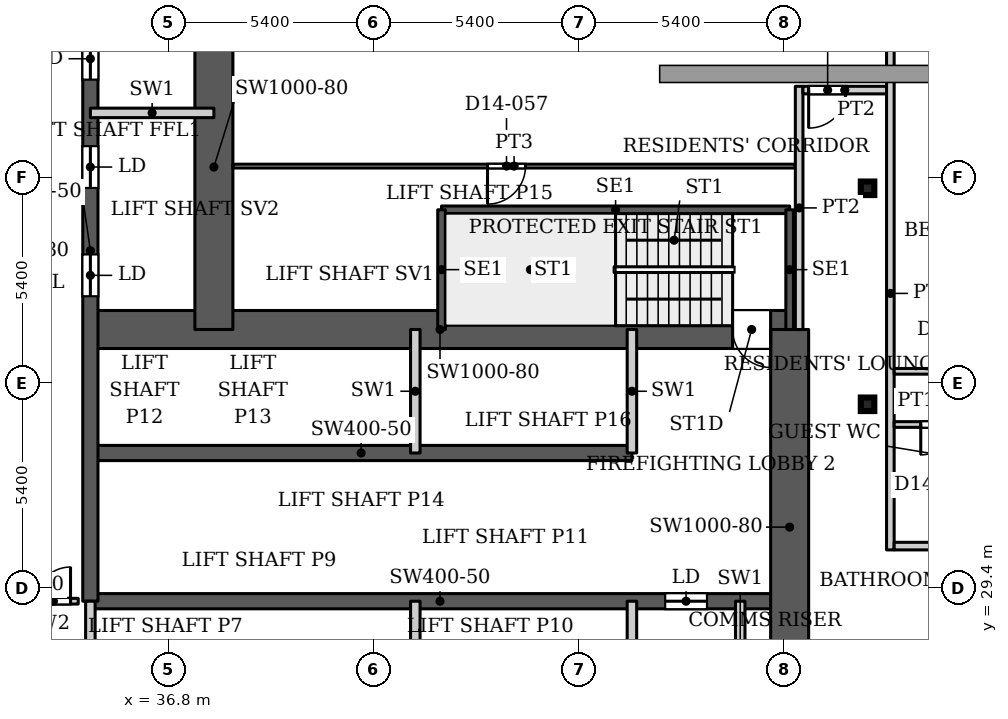
"""IFC4 building model, lengths in metres.
Left out: names, types, materials, properties, quantities, classifications, styles, units other than length and angle.
Written with IfcOpenShell. Run it as: python <this file> out.ifc"""

import sys

from ifc_helpers import new_model, si_unit, direction, frame, frame_2d, origin, origin_2d, place, context, subcontext, project, spatial, rectangle, hollow_rectangle, extrude, source, transform, mapped, element, fill, save


model = new_model("IFC4")
c1 = context("Model", 3, precision=1e-05, world=origin(), true_north=direction((0.0, 1.0)))
c2 = subcontext(c1, "Body", "Model", "MODEL_VIEW")
j1 = project(units=[si_unit("LENGTHUNIT", "METRE"), si_unit("PLANEANGLEUNIT", "RADIAN")], contexts=[c1])
p1 = place(None, origin())
s1 = spatial("IfcSite", under=j1, at=p1, CompositionType="ELEMENT")
p2 = place(p1, origin())
s2 = spatial("IfcBuilding", under=s1, at=p2, CompositionType="ELEMENT")
p3 = place(p2, frame((0.0, 0.0, 61.7)))
s3 = spatial("IfcBuildingStorey", under=s2, at=p3, CompositionType="ELEMENT", Elevation=61.7)
for number, where, z_axis, x_axis in (
    (1, (55.2, 34.232, 0.0), (0.0, 0.0, 1.0), (1.0, 0.0, 0.0)),
    (2, (55.2, 39.916, 0.0), (0.0, 0.0, 1.0), (1.0, 0.0, 0.0)),
):
    element("IfcColumn", number, at=place(p3, frame(where, z_axis=z_axis, x_axis=x_axis)), inside=s3, PredefinedType="COLUMN", context=c2, shape_type="SweptSolid", body=[
        extrude(hollow_rectangle(XDim=0.356, YDim=0.356, WallThickness=0.016, InnerFilletRadius=0.016, OuterFilletRadius=0.032, at=origin_2d()), origin(), (0.0, 0.0, 1.0), 3.9),
    ])
p4 = place(p3, frame((34.75, 29.05, 0.0), z_axis=(0.0, 0.0, 1.0), x_axis=(1.0, 0.0, 0.0)))
e3 = element("IfcWall", 3, at=p4, inside=s3, PredefinedType="SHEAR", context=c2, shape_type="SweptSolid", body=[
    extrude(rectangle(XDim=18.4, YDim=0.4, at=frame_2d((9.2, 0.0))), origin(), (0.0, 0.0, 1.0), 3.9),
])
p5 = place(p4, frame((15.125, 0.0, 0.0)))
e4 = element("IfcOpeningElement", 4, at=p5, cuts=e3, PredefinedType="OPENING", context=c2, shape_type="SweptSolid", body=[
    extrude(rectangle(XDim=1.1, YDim=2.2, at=frame_2d((0.55, 1.1))), frame((0.0, 0.21, 0.0), z_axis=(0.0, -1.0, 0.0), x_axis=(1.0, 0.0, 0.0)), (0.0, 0.0, 1.0), 0.42),
])
p6 = place(p3, frame((34.75, 32.95, 0.0), z_axis=(0.0, 0.0, 1.0), x_axis=(1.0, 0.0, 0.0)))
e5 = element("IfcWall", 5, at=p6, inside=s3, PredefinedType="SHEAR", context=c2, shape_type="SweptSolid", body=[
    extrude(rectangle(XDim=14.25, YDim=0.4, at=frame_2d((7.125, 0.0))), origin(), (0.0, 0.0, 1.0), 3.9),
])
p7 = place(p3, frame((34.75, 36.2, 0.0), z_axis=(0.0, 0.0, 1.0), x_axis=(1.0, 0.0, 0.0)))
e6 = element("IfcWall", 6, at=p7, inside=s3, PredefinedType="SHEAR", context=c2, shape_type="SweptSolid", body=[
    extrude(rectangle(XDim=18.4, YDim=1.0, at=frame_2d((9.2, 0.0))), origin(), (0.0, 0.0, 1.0), 3.9),
])
p8 = place(p7, frame((16.9, 0.0, 0.0)))
e7 = element("IfcOpeningElement", 7, at=p8, cuts=e6, PredefinedType="OPENING", context=c2, shape_type="SweptSolid", body=[
    extrude(rectangle(XDim=1.0, YDim=2.2, at=frame_2d((0.5, 1.1))), frame((0.0, 0.51, 0.0), z_axis=(0.0, -1.0, 0.0), x_axis=(1.0, 0.0, 0.0)), (0.0, 0.0, 1.0), 1.02),
])
p9 = place(p3, frame((34.75, 29.05, 0.0), z_axis=(0.0, 0.0, 1.0), x_axis=(0.0, 1.0, 0.0)))
e8 = element("IfcWall", 8, at=p9, inside=s3, PredefinedType="SHEAR", context=c2, shape_type="SweptSolid", body=[
    extrude(rectangle(XDim=18.45, YDim=0.4, at=frame_2d((9.225, 0.0))), origin(), (0.0, 0.0, 1.0), 3.9),
])
p10 = place(p9, frame((8.025, 0.0, 0.0)))
e9 = element("IfcOpeningElement", 9, at=p10, cuts=e8, PredefinedType="OPENING", context=c2, shape_type="SweptSolid", body=[
    extrude(rectangle(XDim=1.1, YDim=2.2, at=frame_2d((0.55, 1.1))), frame((0.0, 0.21, 0.0), z_axis=(0.0, -1.0, 0.0), x_axis=(1.0, 0.0, 0.0)), (0.0, 0.0, 1.0), 0.42),
])
p11 = place(p9, frame((10.875, 0.0, 0.0)))
e10 = element("IfcOpeningElement", 10, at=p11, cuts=e8, PredefinedType="OPENING", context=c2, shape_type="SweptSolid", body=[
    extrude(rectangle(XDim=1.1, YDim=2.2, at=frame_2d((0.55, 1.1))), frame((0.0, 0.21, 0.0), z_axis=(0.0, -1.0, 0.0), x_axis=(1.0, 0.0, 0.0)), (0.0, 0.0, 1.0), 0.42),
])
p12 = place(p9, frame((13.725, 0.0, 0.0)))
e11 = element("IfcOpeningElement", 11, at=p12, cuts=e8, PredefinedType="OPENING", context=c2, shape_type="SweptSolid", body=[
    extrude(rectangle(XDim=1.1, YDim=2.2, at=frame_2d((0.55, 1.1))), frame((0.0, 0.21, 0.0), z_axis=(0.0, -1.0, 0.0), x_axis=(1.0, 0.0, 0.0)), (0.0, 0.0, 1.0), 0.42),
])
p13 = place(p9, frame((15.95, 0.0, 0.0)))
e12 = element("IfcOpeningElement", 12, at=p13, cuts=e8, PredefinedType="OPENING", context=c2, shape_type="SweptSolid", body=[
    extrude(rectangle(XDim=1.1, YDim=2.2, at=frame_2d((0.55, 1.1))), frame((0.0, 0.21, 0.0), z_axis=(0.0, -1.0, 0.0), x_axis=(1.0, 0.0, 0.0)), (0.0, 0.0, 1.0), 0.42),
])
p14 = place(p3, frame((38.0, 36.2, 0.0), z_axis=(0.0, 0.0, 1.0), x_axis=(0.0, 1.0, 0.0)))
e13 = element("IfcWall", 13, at=p14, inside=s3, PredefinedType="SHEAR", context=c2, shape_type="SweptSolid", body=[
    extrude(rectangle(XDim=8.55, YDim=1.0, at=frame_2d((4.275, 0.0))), origin(), (0.0, 0.0, 1.0), 3.9),
])
p15 = place(p3, frame((53.15, 25.8, 0.0), z_axis=(0.0, 0.0, 1.0), x_axis=(0.0, 1.0, 0.0)))
e14 = element("IfcWall", 14, at=p15, inside=s3, PredefinedType="SHEAR", context=c2, shape_type="SweptSolid", body=[
    extrude(rectangle(XDim=10.4, YDim=1.0, at=frame_2d((5.2, 0.0))), origin(), (0.0, 0.0, 1.0), 3.9),
])
p16 = place(p3, frame((43.99, 39.35, 0.0), z_axis=(0.0, 0.0, 1.0), x_axis=(1.0, 0.0, 0.0)))
e15 = element("IfcWall", 15, at=p16, inside=s3, PredefinedType="SHEAR", context=c2, shape_type="SweptSolid", body=[
    extrude(rectangle(XDim=9.16, YDim=0.2, at=frame_2d((4.58, 0.0))), origin(), (0.0, 0.0, 1.0), 3.9),
])
for number, where, z_axis, x_axis in (
    (16, (43.99, 36.2, 0.0), (0.0, 0.0, 1.0), (0.0, 1.0, 0.0)),
    (17, (53.15, 36.2, 0.0), (0.0, 0.0, 1.0), (0.0, 1.0, 0.0)),
):
    element("IfcWall", number, at=place(p3, frame(where, z_axis=z_axis, x_axis=x_axis)), inside=s3, PredefinedType="SHEAR", context=c2, shape_type="SweptSolid", body=[
        extrude(rectangle(XDim=3.15, YDim=0.2, at=frame_2d((1.575, 0.0))), origin(), (0.0, 0.0, 1.0), 3.9),
    ])
for number, where, z_axis, x_axis in (
    (18, (34.75, 25.8, 0.0), (0.0, 0.0, 1.0), (0.0, 1.0, 0.0)),
    (19, (43.3, 25.8, 0.0), (0.0, 0.0, 1.0), (0.0, 1.0, 0.0)),
    (20, (43.3, 32.95, 0.0), (0.0, 0.0, 1.0), (0.0, 1.0, 0.0)),
    (21, (49.0, 25.8, 0.0), (0.0, 0.0, 1.0), (0.0, 1.0, 0.0)),
    (22, (49.0, 32.95, 0.0), (0.0, 0.0, 1.0), (0.0, 1.0, 0.0)),
    (23, (51.85, 25.8, 0.0), (0.0, 0.0, 1.0), (0.0, 1.0, 0.0)),
    (24, (34.75, 41.9, 0.0), (0.0, 0.0, 1.0), (1.0, 0.0, 0.0)),
):
    element("IfcWall", number, at=place(p3, frame(where, z_axis=z_axis, x_axis=x_axis)), inside=s3, PredefinedType="PARTITIONING", context=c2, shape_type="SweptSolid", body=[
        extrude(rectangle(XDim=3.25, YDim=0.25, at=frame_2d((1.625, 0.0))), origin(), (0.0, 0.0, 1.0), 3.9),
    ])
p17 = place(p3, frame((32.805, 29.05, 0.0), z_axis=(0.0, 0.0, 1.0), x_axis=(1.0, 0.0, 0.0)))
e25 = element("IfcWall", 25, at=p17, inside=s3, PredefinedType="PARTITIONING", context=c2, shape_type="SweptSolid", body=[
    extrude(rectangle(XDim=1.625, YDim=0.15, at=frame_2d((0.812, 0.0))), origin(), (0.0, 0.0, 1.0), 3.9),
])
p18 = place(p17, frame((0.523, 0.0, 0.0)))
e26 = element("IfcOpeningElement", 26, at=p18, cuts=e25, PredefinedType="OPENING", context=c2, shape_type="SweptSolid", body=[
    extrude(rectangle(XDim=0.9, YDim=2.2, at=frame_2d((0.45, 1.1))), frame((0.0, 0.085, 0.0), z_axis=(0.0, -1.0, 0.0), x_axis=(1.0, 0.0, 0.0)), (0.0, 0.0, 1.0), 0.17),
])
p19 = place(p3, frame((38.499, 40.5, 0.0), z_axis=(0.0, 0.0, 1.0), x_axis=(1.0, 0.0, 0.0)))
e27 = element("IfcWall", 27, at=p19, inside=s3, PredefinedType="PARTITIONING", context=c2, shape_type="SweptSolid", body=[
    extrude(rectangle(XDim=14.801, YDim=0.1, at=frame_2d((7.4, 0.0))), origin(), (0.0, 0.0, 1.0), 3.6),
])
p20 = place(p19, frame((6.701, 0.0, 0.0)))
e28 = element("IfcOpeningElement", 28, at=p20, cuts=e27, PredefinedType="OPENING", context=c2, shape_type="SweptSolid", body=[
    extrude(rectangle(XDim=1.0, YDim=2.1, at=frame_2d((0.5, 1.05))), frame((0.0, 0.06, 0.0), z_axis=(0.0, -1.0, 0.0), x_axis=(1.0, 0.0, 0.0)), (0.0, 0.0, 1.0), 0.12),
])
p21 = place(p3, frame((53.4, 36.199, 0.0), z_axis=(0.0, 0.0, 1.0), x_axis=(0.0, 1.0, 0.0)))
e29 = element("IfcWall", 29, at=p21, inside=s3, PredefinedType="PARTITIONING", context=c2, shape_type="SweptSolid", body=[
    extrude(rectangle(XDim=6.401, YDim=0.2, at=frame_2d((3.201, 0.0))), origin(), (0.0, 0.0, 1.0), 3.6),
])
p22 = place(p3, frame((53.5, 42.5, 0.0), z_axis=(0.0, 0.0, 1.0), x_axis=(1.0, 0.0, 0.0)))
e30 = element("IfcWall", 30, at=p22, inside=s3, PredefinedType="PARTITIONING", context=c2, shape_type="SweptSolid", body=[
    extrude(rectangle(XDim=2.2, YDim=0.2, at=frame_2d((1.1, 0.0))), origin(), (0.0, 0.0, 1.0), 3.6),
])
p23 = place(p22, frame((0.15, 0.0, 0.0)))
e31 = element("IfcOpeningElement", 31, at=p23, cuts=e30, PredefinedType="OPENING", context=c2, shape_type="SweptSolid", body=[
    extrude(rectangle(XDim=1.0, YDim=2.1, at=frame_2d((0.5, 1.05))), frame((0.0, 0.11, 0.0), z_axis=(0.0, -1.0, 0.0), x_axis=(1.0, 0.0, 0.0)), (0.0, 0.0, 1.0), 0.22),
])
p24 = place(p3, frame((55.8, 30.4, 0.0), z_axis=(0.0, 0.0, 1.0), x_axis=(0.0, 1.0, 0.0)))
e32 = element("IfcWall", 32, at=p24, inside=s3, PredefinedType="PARTITIONING", context=c2, shape_type="SweptSolid", body=[
    extrude(rectangle(XDim=13.5, YDim=0.2, at=frame_2d((6.75, 0.0))), origin(), (0.0, 0.0, 1.0), 3.6),
])
p25 = place(p3, frame((55.9, 30.5, 0.0), z_axis=(0.0, 0.0, 1.0), x_axis=(1.0, 0.0, 0.0)))
e33 = element("IfcWall", 33, at=p25, inside=s3, PredefinedType="PARTITIONING", context=c2, shape_type="SweptSolid", body=[
    extrude(rectangle(XDim=42.2, YDim=0.2, at=frame_2d((21.1, 0.0))), origin(), (0.0, 0.0, 1.0), 3.6),
])
p26 = place(p25, frame((14.7, 0.0, 0.0)))
e34 = element("IfcOpeningElement", 34, at=p26, cuts=e33, PredefinedType="OPENING", context=c2, shape_type="SweptSolid", body=[
    extrude(rectangle(XDim=1.0, YDim=2.1, at=frame_2d((0.5, 1.05))), frame((0.0, 0.11, 0.0), z_axis=(0.0, -1.0, 0.0), x_axis=(1.0, 0.0, 0.0)), (0.0, 0.0, 1.0), 0.22),
])
p27 = place(p25, frame((27.9, 0.0, 0.0)))
e35 = element("IfcOpeningElement", 35, at=p27, cuts=e33, PredefinedType="OPENING", context=c2, shape_type="SweptSolid", body=[
    extrude(rectangle(XDim=1.0, YDim=2.1, at=frame_2d((0.5, 1.05))), frame((0.0, 0.11, 0.0), z_axis=(0.0, -1.0, 0.0), x_axis=(1.0, 0.0, 0.0)), (0.0, 0.0, 1.0), 0.22),
])
p28 = place(p25, frame((39.0, 0.0, 0.0)))
e36 = element("IfcOpeningElement", 36, at=p28, cuts=e33, PredefinedType="OPENING", context=c2, shape_type="SweptSolid", body=[
    extrude(rectangle(XDim=1.0, YDim=2.1, at=frame_2d((0.5, 1.05))), frame((0.0, 0.11, 0.0), z_axis=(0.0, -1.0, 0.0), x_axis=(1.0, 0.0, 0.0)), (0.0, 0.0, 1.0), 0.22),
])
p29 = place(p3, frame((55.9, 33.7, 0.0), z_axis=(0.0, 0.0, 1.0), x_axis=(1.0, 0.0, 0.0)))
e37 = element("IfcWall", 37, at=p29, inside=s3, PredefinedType="PARTITIONING", context=c2, shape_type="SweptSolid", body=[
    extrude(rectangle(XDim=14.35, YDim=0.15, at=frame_2d((7.175, 0.0))), origin(), (0.0, 0.0, 1.0), 3.6),
])
p30 = place(p29, frame((0.7, 0.0, 0.0)))
e38 = element("IfcOpeningElement", 38, at=p30, cuts=e37, PredefinedType="OPENING", context=c2, shape_type="SweptSolid", body=[
    extrude(rectangle(XDim=0.8, YDim=2.1, at=frame_2d((0.4, 1.05))), frame((0.0, 0.085, 0.0), z_axis=(0.0, -1.0, 0.0), x_axis=(1.0, 0.0, 0.0)), (0.0, 0.0, 1.0), 0.17),
])
p31 = place(p29, frame((12.3, 0.0, 0.0)))
e39 = element("IfcOpeningElement", 39, at=p31, cuts=e37, PredefinedType="OPENING", context=c2, shape_type="SweptSolid", body=[
    extrude(rectangle(XDim=0.8, YDim=2.1, at=frame_2d((0.4, 1.05))), frame((0.0, 0.085, 0.0), z_axis=(0.0, -1.0, 0.0), x_axis=(1.0, 0.0, 0.0)), (0.0, 0.0, 1.0), 0.17),
])
p32 = place(p29, frame((3.35, 0.0, 0.0)))
e40 = element("IfcOpeningElement", 40, at=p32, cuts=e37, PredefinedType="OPENING", context=c2, shape_type="SweptSolid", body=[
    extrude(rectangle(XDim=0.9, YDim=2.1, at=frame_2d((0.45, 1.05))), frame((0.0, 0.085, 0.0), z_axis=(0.0, -1.0, 0.0), x_axis=(1.0, 0.0, 0.0)), (0.0, 0.0, 1.0), 0.17),
])
p33 = place(p29, frame((10.6, 0.0, 0.0)))
e41 = element("IfcOpeningElement", 41, at=p33, cuts=e37, PredefinedType="OPENING", context=c2, shape_type="SweptSolid", body=[
    extrude(rectangle(XDim=0.8, YDim=2.1, at=frame_2d((0.4, 1.05))), frame((0.0, 0.085, 0.0), z_axis=(0.0, -1.0, 0.0), x_axis=(1.0, 0.0, 0.0)), (0.0, 0.0, 1.0), 0.17),
])
p34 = place(p29, frame((7.3, 0.0, 0.0)))
e42 = element("IfcOpeningElement", 42, at=p34, cuts=e37, PredefinedType="OPENING", context=c2, shape_type="SweptSolid", body=[
    extrude(rectangle(XDim=0.8, YDim=2.1, at=frame_2d((0.4, 1.05))), frame((0.0, 0.085, 0.0), z_axis=(0.0, -1.0, 0.0), x_axis=(1.0, 0.0, 0.0)), (0.0, 0.0, 1.0), 0.17),
])
p35 = place(p29, frame((5.65, 0.0, 0.0)))
e43 = element("IfcOpeningElement", 43, at=p35, cuts=e37, PredefinedType="OPENING", context=c2, shape_type="SweptSolid", body=[
    extrude(rectangle(XDim=0.8, YDim=2.1, at=frame_2d((0.4, 1.05))), frame((0.0, 0.085, 0.0), z_axis=(0.0, -1.0, 0.0), x_axis=(1.0, 0.0, 0.0)), (0.0, 0.0, 1.0), 0.17),
])
p36 = place(p3, frame((55.9, 35.1, 0.0), z_axis=(0.0, 0.0, 1.0), x_axis=(1.0, 0.0, 0.0)))
e44 = element("IfcWall", 44, at=p36, inside=s3, PredefinedType="PARTITIONING", context=c2, shape_type="SweptSolid", body=[
    extrude(rectangle(XDim=18.4, YDim=0.15, at=frame_2d((9.2, 0.0))), origin(), (0.0, 0.0, 1.0), 3.6),
])
p37 = place(p36, frame((1.25, 0.0, 0.0)))
e45 = element("IfcOpeningElement", 45, at=p37, cuts=e44, PredefinedType="OPENING", context=c2, shape_type="SweptSolid", body=[
    extrude(rectangle(XDim=0.9, YDim=2.1, at=frame_2d((0.45, 1.05))), frame((0.0, 0.085, 0.0), z_axis=(0.0, -1.0, 0.0), x_axis=(1.0, 0.0, 0.0)), (0.0, 0.0, 1.0), 0.17),
])
p38 = place(p36, frame((9.2, 0.0, 0.0)))
e46 = element("IfcOpeningElement", 46, at=p38, cuts=e44, PredefinedType="OPENING", context=c2, shape_type="SweptSolid", body=[
    extrude(rectangle(XDim=0.9, YDim=2.1, at=frame_2d((0.45, 1.05))), frame((0.0, 0.085, 0.0), z_axis=(0.0, -1.0, 0.0), x_axis=(1.0, 0.0, 0.0)), (0.0, 0.0, 1.0), 0.17),
])
p39 = place(p36, frame((12.35, 0.0, 0.0)))
e47 = element("IfcOpeningElement", 47, at=p39, cuts=e44, PredefinedType="OPENING", context=c2, shape_type="SweptSolid", body=[
    extrude(rectangle(XDim=1.0, YDim=2.1, at=frame_2d((0.5, 1.05))), frame((0.0, 0.085, 0.0), z_axis=(0.0, -1.0, 0.0), x_axis=(1.0, 0.0, 0.0)), (0.0, 0.0, 1.0), 0.17),
])
p40 = place(p36, frame((15.9, 0.0, 0.0)))
e48 = element("IfcOpeningElement", 48, at=p40, cuts=e44, PredefinedType="OPENING", context=c2, shape_type="SweptSolid", body=[
    extrude(rectangle(XDim=1.6, YDim=2.1, at=frame_2d((0.8, 1.05))), frame((0.0, 0.085, 0.0), z_axis=(0.0, -1.0, 0.0), x_axis=(1.0, 0.0, 0.0)), (0.0, 0.0, 1.0), 0.17),
])
p41 = place(p36, frame((4.4, 0.0, 0.0)))
e49 = element("IfcOpeningElement", 49, at=p41, cuts=e44, PredefinedType="OPENING", context=c2, shape_type="SweptSolid", body=[
    extrude(rectangle(XDim=0.9, YDim=2.1, at=frame_2d((0.45, 1.05))), frame((0.0, 0.085, 0.0), z_axis=(0.0, -1.0, 0.0), x_axis=(1.0, 0.0, 0.0)), (0.0, 0.0, 1.0), 0.17),
])
m1 = source(origin(), c2, "Body", "SweptSolid", [
    extrude(rectangle(XDim=1.1, YDim=2.2, at=frame_2d((0.55, 1.1))), frame((0.0, 0.025, 0.0), z_axis=(0.0, -1.0, 0.0), x_axis=(1.0, 0.0, 0.0)), (0.0, 0.0, 1.0), 0.05),
])
p42 = place(p10, origin())
e50 = element("IfcDoor", 50, at=p42, inside=s3, OperationType="SLIDING_TO_LEFT", PredefinedType="DOOR", context=c2, shape_type="MappedRepresentation", body=[
    mapped(m1, transform((0.0, 0.0, 0.0), x_axis=(1.0, 0.0, 0.0), y_axis=(0.0, 1.0, 0.0), z_axis=(0.0, 0.0, 1.0), scale=1.0)),
])
fill(e9, e50)
p43 = place(p11, origin())
e51 = element("IfcDoor", 51, at=p43, inside=s3, OperationType="SLIDING_TO_LEFT", PredefinedType="DOOR", context=c2, shape_type="MappedRepresentation", body=[
    mapped(m1, transform((0.0, 0.0, 0.0), x_axis=(1.0, 0.0, 0.0), y_axis=(0.0, 1.0, 0.0), z_axis=(0.0, 0.0, 1.0), scale=1.0)),
])
fill(e10, e51)
p44 = place(p12, origin())
e52 = element("IfcDoor", 52, at=p44, inside=s3, OperationType="SLIDING_TO_LEFT", PredefinedType="DOOR", context=c2, shape_type="MappedRepresentation", body=[
    mapped(m1, transform((0.0, 0.0, 0.0), x_axis=(1.0, 0.0, 0.0), y_axis=(0.0, 1.0, 0.0), z_axis=(0.0, 0.0, 1.0), scale=1.0)),
])
fill(e11, e52)
p45 = place(p5, origin())
e53 = element("IfcDoor", 53, at=p45, inside=s3, OperationType="SLIDING_TO_LEFT", PredefinedType="DOOR", context=c2, shape_type="MappedRepresentation", body=[
    mapped(m1, transform((0.0, 0.0, 0.0), x_axis=(1.0, 0.0, 0.0), y_axis=(0.0, 1.0, 0.0), z_axis=(0.0, 0.0, 1.0), scale=1.0)),
])
fill(e4, e53)
m2 = source(origin(), c2, "Body", "SweptSolid", [
    extrude(rectangle(XDim=0.9, YDim=2.2, at=frame_2d((0.45, 1.1))), frame((0.0, 0.025, 0.0), z_axis=(0.0, -1.0, 0.0), x_axis=(1.0, 0.0, 0.0)), (0.0, 0.0, 1.0), 0.05),
])
p46 = place(p18, origin())
e54 = element("IfcDoor", 54, at=p46, inside=s3, OperationType="SINGLE_SWING_LEFT", PredefinedType="DOOR", context=c2, shape_type="MappedRepresentation", body=[
    mapped(m2, transform((0.0, 0.0, 0.0), x_axis=(1.0, 0.0, 0.0), y_axis=(0.0, 1.0, 0.0), z_axis=(0.0, 0.0, 1.0), scale=1.0)),
])
fill(e26, e54)
m3 = source(origin(), c2, "Body", "SweptSolid", [
    extrude(rectangle(XDim=1.0, YDim=2.2, at=frame_2d((0.5, 1.1))), frame((0.0, 0.025, 0.0), z_axis=(0.0, -1.0, 0.0), x_axis=(1.0, 0.0, 0.0)), (0.0, 0.0, 1.0), 0.05),
])
p47 = place(p8, origin())
e55 = element("IfcDoor", 55, at=p47, inside=s3, OperationType="SINGLE_SWING_RIGHT", PredefinedType="DOOR", context=c2, shape_type="MappedRepresentation", body=[
    mapped(m3, transform((0.0, 0.0, 0.0), x_axis=(1.0, 0.0, 0.0), y_axis=(0.0, 1.0, 0.0), z_axis=(0.0, 0.0, 1.0), scale=1.0)),
])
fill(e7, e55)
m4 = source(origin(), c2, "Body", "SweptSolid", [
    extrude(rectangle(XDim=0.8, YDim=2.1, at=frame_2d((0.4, 1.05))), frame((0.0, 0.025, 0.0), z_axis=(0.0, -1.0, 0.0), x_axis=(1.0, 0.0, 0.0)), (0.0, 0.0, 1.0), 0.05),
])
p48 = place(p30, origin())
e56 = element("IfcDoor", 56, at=p48, inside=s3, OperationType="SINGLE_SWING_RIGHT", PredefinedType="DOOR", context=c2, shape_type="MappedRepresentation", body=[
    mapped(m4, transform((0.0, 0.0, 0.0), x_axis=(1.0, 0.0, 0.0), y_axis=(0.0, 1.0, 0.0), z_axis=(0.0, 0.0, 1.0), scale=1.0)),
])
fill(e38, e56)
m5 = source(origin(), c2, "Body", "SweptSolid", [
    extrude(rectangle(XDim=1.0, YDim=2.1, at=frame_2d((0.5, 1.05))), frame((0.0, 0.025, 0.0), z_axis=(0.0, -1.0, 0.0), x_axis=(1.0, 0.0, 0.0)), (0.0, 0.0, 1.0), 0.05),
])
p49 = place(p20, origin())
e57 = element("IfcDoor", 57, at=p49, inside=s3, OperationType="SINGLE_SWING_RIGHT", PredefinedType="DOOR", context=c2, shape_type="MappedRepresentation", body=[
    mapped(m5, transform((0.0, 0.0, 0.0), x_axis=(1.0, 0.0, 0.0), y_axis=(0.0, 1.0, 0.0), z_axis=(0.0, 0.0, 1.0), scale=1.0)),
])
fill(e28, e57)
m6 = source(origin(), c2, "Body", "SweptSolid", [
    extrude(rectangle(XDim=1.0, YDim=2.1, at=frame_2d((0.5, 1.05))), frame((0.0, 0.025, 0.0), z_axis=(0.0, -1.0, 0.0), x_axis=(1.0, 0.0, 0.0)), (0.0, 0.0, 1.0), 0.05),
])
p50 = place(p23, origin())
e58 = element("IfcDoor", 58, at=p50, inside=s3, OperationType="SINGLE_SWING_RIGHT", PredefinedType="DOOR", context=c2, shape_type="MappedRepresentation", body=[
    mapped(m6, transform((0.0, 0.0, 0.0), x_axis=(1.0, 0.0, 0.0), y_axis=(0.0, 1.0, 0.0), z_axis=(0.0, 0.0, 1.0), scale=1.0)),
])
fill(e31, e58)
save(model, sys.argv[1])
